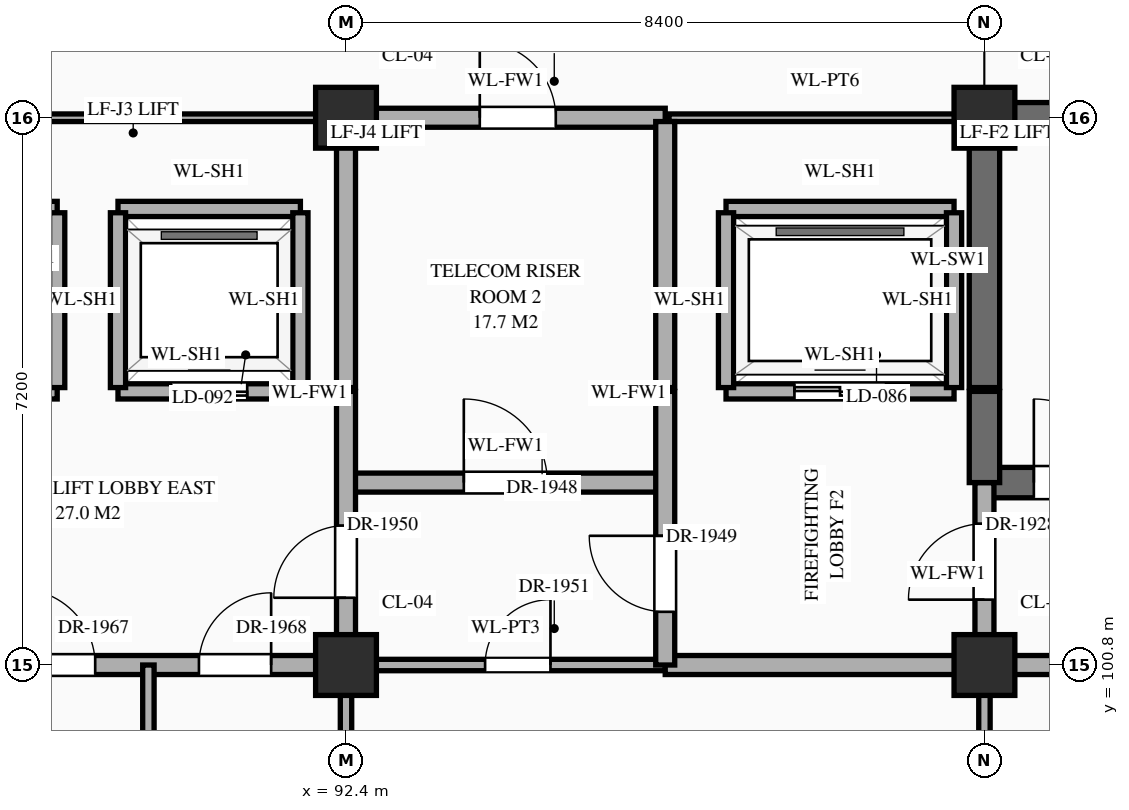
"""IFC4 building model, lengths in metres.
Left out: names, types, materials, properties, quantities, classifications, styles, units other than length and angle.
Written with IfcOpenShell. Run it as: python <this file> out.ifc"""

import sys

from ifc_helpers import new_model, si_unit, direction, frame, frame_2d, origin, origin_2d, place, context, subcontext, project, spatial, rectangle, extrude, element, fill, save


model = new_model("IFC4")
c1 = context("Model", 3, precision=1e-05, world=origin(), true_north=direction((0.0, 1.0)))
c2 = subcontext(c1, "Body", "Model", "MODEL_VIEW")
j1 = project(units=[si_unit("LENGTHUNIT", "METRE"), si_unit("PLANEANGLEUNIT", "RADIAN")], contexts=[c1])
p1 = place(None, origin())
s1 = spatial("IfcSite", under=j1, at=p1, CompositionType="ELEMENT")
p2 = place(p1, origin())
s2 = spatial("IfcBuilding", under=s1, at=p2, CompositionType="ELEMENT")
p3 = place(p2, frame((0.0, 0.0, 21.6)))
s3 = spatial("IfcBuildingStorey", under=s2, at=p3, CompositionType="ELEMENT", Elevation=21.6)
for number, where, z_axis, x_axis in (
    (1, (92.4, 100.8, 0.0), (0.0, 0.0, 1.0), (1.0, 0.0, 0.0)),
    (2, (92.4, 108.0, 0.0), (0.0, 0.0, 1.0), (1.0, 0.0, 0.0)),
    (3, (100.8, 100.8, 0.0), (0.0, 0.0, 1.0), (1.0, 0.0, 0.0)),
    (4, (100.8, 108.0, 0.0), (0.0, 0.0, 1.0), (1.0, 0.0, 0.0)),
):
    element("IfcColumn", number, at=place(p3, frame(where, z_axis=z_axis, x_axis=x_axis)), inside=s3, PredefinedType="COLUMN", context=c2, shape_type="SweptSolid", body=[
        extrude(rectangle(XDim=0.8, YDim=0.8, at=origin_2d()), origin(), (0.0, 0.0, 1.0), 4.5),
    ])
p4 = place(p3, frame((75.6, 100.8, 0.0), z_axis=(0.0, 0.0, 1.0), x_axis=(1.0, 0.0, 0.0)))
e5 = element("IfcWall", 5, at=p4, inside=s3, PredefinedType="STANDARD", context=c2, shape_type="SweptSolid", body=[
    extrude(rectangle(XDim=16.8, YDim=0.25, at=frame_2d((8.4, 0.0))), origin(), (0.0, 0.0, 1.0), 3.39),
])
p5 = place(p4, frame((3.7, 0.0, 0.0)))
e6 = element("IfcOpeningElement", 6, at=p5, cuts=e5, PredefinedType="OPENING", context=c2, shape_type="SweptSolid", body=[
    extrude(rectangle(XDim=1.0, YDim=2.2, at=frame_2d((0.5, 1.1))), frame((0.0, 0.137, 0.0), z_axis=(0.0, -1.0, 0.0), x_axis=(1.0, 0.0, 0.0)), (0.0, 0.0, 1.0), 0.274),
])
p6 = place(p4, frame((9.71, 0.0, 0.0)))
e7 = element("IfcOpeningElement", 7, at=p6, cuts=e5, PredefinedType="OPENING", context=c2, shape_type="SweptSolid", body=[
    extrude(rectangle(XDim=1.1, YDim=2.2, at=frame_2d((0.55, 1.1))), frame((0.0, 0.137, 0.0), z_axis=(0.0, -1.0, 0.0), x_axis=(1.0, 0.0, 0.0)), (0.0, 0.0, 1.0), 0.274),
])
p7 = place(p4, frame((12.5, 0.0, 0.0)))
e8 = element("IfcOpeningElement", 8, at=p7, cuts=e5, PredefinedType="OPENING", context=c2, shape_type="SweptSolid", body=[
    extrude(rectangle(XDim=1.0, YDim=2.2, at=frame_2d((0.5, 1.1))), frame((0.0, 0.137, 0.0), z_axis=(0.0, -1.0, 0.0), x_axis=(1.0, 0.0, 0.0)), (0.0, 0.0, 1.0), 0.274),
])
p8 = place(p4, frame((14.865, 0.0, 0.0)))
e9 = element("IfcOpeningElement", 9, at=p8, cuts=e5, PredefinedType="OPENING", context=c2, shape_type="SweptSolid", body=[
    extrude(rectangle(XDim=0.95, YDim=2.15, at=frame_2d((0.475, 1.075))), frame((0.0, 0.137, 0.0), z_axis=(0.0, -1.0, 0.0), x_axis=(1.0, 0.0, 0.0)), (0.0, 0.0, 1.0), 0.274),
])
p9 = place(p3, frame((92.4, 100.8, 0.0), z_axis=(0.0, 0.0, 1.0), x_axis=(1.0, 0.0, 0.0)))
e10 = element("IfcWall", 10, at=p9, inside=s3, PredefinedType="STANDARD", context=c2, shape_type="SweptSolid", body=[
    extrude(rectangle(XDim=4.2, YDim=0.15, at=frame_2d((2.1, 0.0))), origin(), (0.0, 0.0, 1.0), 3.39),
])
p10 = place(p9, frame((1.83, 0.0, 0.0)))
e11 = element("IfcOpeningElement", 11, at=p10, cuts=e10, PredefinedType="OPENING", context=c2, shape_type="SweptSolid", body=[
    extrude(rectangle(XDim=0.86, YDim=2.1, at=frame_2d((0.43, 1.05))), frame((0.0, 0.087, 0.0), z_axis=(0.0, -1.0, 0.0), x_axis=(1.0, 0.0, 0.0)), (0.0, 0.0, 1.0), 0.174),
])
p11 = place(p3, frame((96.6, 100.8, 0.0), z_axis=(0.0, 0.0, 1.0), x_axis=(1.0, 0.0, 0.0)))
e12 = element("IfcWall", 12, at=p11, inside=s3, PredefinedType="STANDARD", context=c2, shape_type="SweptSolid", body=[
    extrude(rectangle(XDim=12.6, YDim=0.25, at=frame_2d((6.3, 0.0))), origin(), (0.0, 0.0, 1.0), 3.39),
])
p12 = place(p11, frame((7.85, 0.0, 0.0)))
e13 = element("IfcOpeningElement", 13, at=p12, cuts=e12, PredefinedType="OPENING", context=c2, shape_type="SweptSolid", body=[
    extrude(rectangle(XDim=1.1, YDim=2.2, at=frame_2d((0.55, 1.1))), frame((0.0, 0.137, 0.0), z_axis=(0.0, -1.0, 0.0), x_axis=(1.0, 0.0, 0.0)), (0.0, 0.0, 1.0), 0.274),
])
p13 = place(p3, frame((92.4, 103.2, 0.0), z_axis=(0.0, 0.0, 1.0), x_axis=(1.0, 0.0, 0.0)))
e14 = element("IfcWall", 14, at=p13, inside=s3, PredefinedType="STANDARD", context=c2, shape_type="SweptSolid", body=[
    extrude(rectangle(XDim=4.2, YDim=0.25, at=frame_2d((2.1, 0.0))), origin(), (0.0, 0.0, 1.0), 4.24),
])
p14 = place(p13, frame((1.55, 0.0, 0.0)))
e15 = element("IfcOpeningElement", 15, at=p14, cuts=e14, PredefinedType="OPENING", context=c2, shape_type="SweptSolid", body=[
    extrude(rectangle(XDim=1.1, YDim=2.2, at=frame_2d((0.55, 1.1))), frame((0.0, 0.137, 0.0), z_axis=(0.0, -1.0, 0.0), x_axis=(1.0, 0.0, 0.0)), (0.0, 0.0, 1.0), 0.274),
])
p15 = place(p3, frame((100.8, 103.2, 0.0), z_axis=(0.0, 0.0, 1.0), x_axis=(1.0, 0.0, 0.0)))
e16 = element("IfcWall", 16, at=p15, inside=s3, PredefinedType="SHEAR", context=c2, shape_type="SweptSolid", body=[
    extrude(rectangle(XDim=8.4, YDim=0.4, at=frame_2d((4.2, 0.0))), origin(), (0.0, 0.0, 1.0), 4.24),
])
p16 = place(p15, frame((0.65, 0.0, 0.0)))
e17 = element("IfcOpeningElement", 17, at=p16, cuts=e16, PredefinedType="OPENING", context=c2, shape_type="SweptSolid", body=[
    extrude(rectangle(XDim=1.1, YDim=2.2, at=frame_2d((0.55, 1.1))), frame((0.0, 0.212, 0.0), z_axis=(0.0, -1.0, 0.0), x_axis=(1.0, 0.0, 0.0)), (0.0, 0.0, 1.0), 0.424),
])
p17 = place(p3, frame((86.2, 104.4, 0.0), z_axis=(0.0, 0.0, 1.0), x_axis=(1.0, 0.0, 0.0)))
e18 = element("IfcWall", 18, at=p17, inside=s3, PredefinedType="STANDARD", context=c2, shape_type="SweptSolid", body=[
    extrude(rectangle(XDim=2.4, YDim=0.2, at=frame_2d((1.2, 0.0))), origin(), (0.0, 0.0, 1.0), 4.24),
])
p18 = place(p17, frame((0.7, 0.0, 0.0)))
e19 = element("IfcOpeningElement", 19, at=p18, cuts=e18, PredefinedType="OPENING", context=c2, shape_type="SweptSolid", body=[
    extrude(rectangle(XDim=1.0, YDim=2.15, at=frame_2d((0.5, 1.075))), frame((0.0, 0.112, 0.0), z_axis=(0.0, -1.0, 0.0), x_axis=(1.0, 0.0, 0.0)), (0.0, 0.0, 1.0), 0.224),
])
p19 = place(p3, frame((89.4, 104.4, 0.0), z_axis=(0.0, 0.0, 1.0), x_axis=(1.0, 0.0, 0.0)))
e20 = element("IfcWall", 20, at=p19, inside=s3, PredefinedType="STANDARD", context=c2, shape_type="SweptSolid", body=[
    extrude(rectangle(XDim=2.4, YDim=0.2, at=frame_2d((1.2, 0.0))), origin(), (0.0, 0.0, 1.0), 4.24),
])
p20 = place(p19, frame((0.7, 0.0, 0.0)))
e21 = element("IfcOpeningElement", 21, at=p20, cuts=e20, PredefinedType="OPENING", context=c2, shape_type="SweptSolid", body=[
    extrude(rectangle(XDim=1.0, YDim=2.15, at=frame_2d((0.5, 1.075))), frame((0.0, 0.112, 0.0), z_axis=(0.0, -1.0, 0.0), x_axis=(1.0, 0.0, 0.0)), (0.0, 0.0, 1.0), 0.224),
])
p21 = place(p3, frame((97.4, 104.4, 0.0), z_axis=(0.0, 0.0, 1.0), x_axis=(1.0, 0.0, 0.0)))
e22 = element("IfcWall", 22, at=p21, inside=s3, PredefinedType="STANDARD", context=c2, shape_type="SweptSolid", body=[
    extrude(rectangle(XDim=3.0, YDim=0.2, at=frame_2d((1.5, 0.0))), origin(), (0.0, 0.0, 1.0), 4.24),
])
p22 = place(p21, frame((0.9, 0.0, 0.0)))
e23 = element("IfcOpeningElement", 23, at=p22, cuts=e22, PredefinedType="OPENING", context=c2, shape_type="SweptSolid", body=[
    extrude(rectangle(XDim=1.2, YDim=2.15, at=frame_2d((0.6, 1.075))), frame((0.0, 0.112, 0.0), z_axis=(0.0, -1.0, 0.0), x_axis=(1.0, 0.0, 0.0)), (0.0, 0.0, 1.0), 0.224),
])
for number, where, z_axis, x_axis in (
    (24, (86.2, 106.8, 0.0), (0.0, 0.0, 1.0), (1.0, 0.0, 0.0)),
    (25, (89.4, 106.8, 0.0), (0.0, 0.0, 1.0), (1.0, 0.0, 0.0)),
):
    element("IfcWall", number, at=place(p3, frame(where, z_axis=z_axis, x_axis=x_axis)), inside=s3, PredefinedType="STANDARD", context=c2, shape_type="SweptSolid", body=[
        extrude(rectangle(XDim=2.4, YDim=0.2, at=frame_2d((1.2, 0.0))), origin(), (0.0, 0.0, 1.0), 4.24),
    ])
p23 = place(p3, frame((97.4, 106.8, 0.0), z_axis=(0.0, 0.0, 1.0), x_axis=(1.0, 0.0, 0.0)))
e26 = element("IfcWall", 26, at=p23, inside=s3, PredefinedType="STANDARD", context=c2, shape_type="SweptSolid", body=[
    extrude(rectangle(XDim=3.0, YDim=0.2, at=frame_2d((1.5, 0.0))), origin(), (0.0, 0.0, 1.0), 4.24),
])
p24 = place(p3, frame((86.2, 108.0, 0.0), z_axis=(0.0, 0.0, 1.0), x_axis=(1.0, 0.0, 0.0)))
e27 = element("IfcWall", 27, at=p24, inside=s3, PredefinedType="STANDARD", context=c2, shape_type="SweptSolid", body=[
    extrude(rectangle(XDim=6.15, YDim=0.1, at=frame_2d((3.075, 0.0))), origin(), (0.0, 0.0, 1.0), 3.39),
])
p25 = place(p3, frame((92.4, 108.0, 0.0), z_axis=(0.0, 0.0, 1.0), x_axis=(1.0, 0.0, 0.0)))
e28 = element("IfcWall", 28, at=p25, inside=s3, PredefinedType="STANDARD", context=c2, shape_type="SweptSolid", body=[
    extrude(rectangle(XDim=4.2, YDim=0.25, at=frame_2d((2.1, 0.0))), origin(), (0.0, 0.0, 1.0), 3.39),
])
p26 = place(p25, frame((1.76, 0.0, 0.0)))
e29 = element("IfcOpeningElement", 29, at=p26, cuts=e28, PredefinedType="OPENING", context=c2, shape_type="SweptSolid", body=[
    extrude(rectangle(XDim=1.0, YDim=2.2, at=frame_2d((0.5, 1.1))), frame((0.0, 0.137, 0.0), z_axis=(0.0, -1.0, 0.0), x_axis=(1.0, 0.0, 0.0)), (0.0, 0.0, 1.0), 0.274),
])
p27 = place(p3, frame((96.65, 108.0, 0.0), z_axis=(0.0, 0.0, 1.0), x_axis=(1.0, 0.0, 0.0)))
e30 = element("IfcWall", 30, at=p27, inside=s3, PredefinedType="STANDARD", context=c2, shape_type="SweptSolid", body=[
    extrude(rectangle(XDim=4.1, YDim=0.1, at=frame_2d((2.05, 0.0))), origin(), (0.0, 0.0, 1.0), 3.39),
])
p28 = place(p3, frame((100.8, 108.0, 0.0), z_axis=(0.0, 0.0, 1.0), x_axis=(1.0, 0.0, 0.0)))
e31 = element("IfcWall", 31, at=p28, inside=s3, PredefinedType="SHEAR", context=c2, shape_type="SweptSolid", body=[
    extrude(rectangle(XDim=8.4, YDim=0.4, at=frame_2d((4.2, 0.0))), origin(), (0.0, 0.0, 1.0), 4.24),
])
for number, where, z_axis, x_axis in (
    (32, (88.6, 104.45, 0.0), (0.0, 0.0, 1.0), (0.0, 1.0, 0.0)),
    (33, (89.4, 104.45, 0.0), (0.0, 0.0, 1.0), (0.0, 1.0, 0.0)),
):
    element("IfcWall", number, at=place(p3, frame(where, z_axis=z_axis, x_axis=x_axis)), inside=s3, PredefinedType="STANDARD", context=c2, shape_type="SweptSolid", body=[
        extrude(rectangle(XDim=2.3, YDim=0.2, at=frame_2d((1.15, 0.0))), origin(), (0.0, 0.0, 1.0), 4.24),
    ])
p29 = place(p3, frame((89.8, 96.0, 0.0), z_axis=(0.0, 0.0, 1.0), x_axis=(0.0, 1.0, 0.0)))
e34 = element("IfcWall", 34, at=p29, inside=s3, PredefinedType="STANDARD", context=c2, shape_type="SweptSolid", body=[
    extrude(rectangle(XDim=4.8, YDim=0.15, at=frame_2d((2.4, 0.0))), origin(), (0.0, 0.0, 1.0), 4.24),
])
p30 = place(p29, frame((1.95, 0.0, 0.0)))
e35 = element("IfcOpeningElement", 35, at=p30, cuts=e34, PredefinedType="OPENING", context=c2, shape_type="SweptSolid", body=[
    extrude(rectangle(XDim=0.9, YDim=2.15, at=frame_2d((0.45, 1.075))), frame((0.0, 0.087, 0.0), z_axis=(0.0, -1.0, 0.0), x_axis=(1.0, 0.0, 0.0)), (0.0, 0.0, 1.0), 0.174),
])
p31 = place(p3, frame((91.8, 104.45, 0.0), z_axis=(0.0, 0.0, 1.0), x_axis=(0.0, 1.0, 0.0)))
e36 = element("IfcWall", 36, at=p31, inside=s3, PredefinedType="STANDARD", context=c2, shape_type="SweptSolid", body=[
    extrude(rectangle(XDim=2.3, YDim=0.2, at=frame_2d((1.15, 0.0))), origin(), (0.0, 0.0, 1.0), 4.24),
])
p32 = place(p3, frame((92.4, 96.0, 0.0), z_axis=(0.0, 0.0, 1.0), x_axis=(0.0, 1.0, 0.0)))
e37 = element("IfcWall", 37, at=p32, inside=s3, PredefinedType="STANDARD", context=c2, shape_type="SweptSolid", body=[
    extrude(rectangle(XDim=4.8, YDim=0.15, at=frame_2d((2.4, 0.0))), origin(), (0.0, 0.0, 1.0), 3.49),
])
p33 = place(p3, frame((92.4, 100.8, 0.0), z_axis=(0.0, 0.0, 1.0), x_axis=(0.0, 1.0, 0.0)))
e38 = element("IfcWall", 38, at=p33, inside=s3, PredefinedType="STANDARD", context=c2, shape_type="SweptSolid", body=[
    extrude(rectangle(XDim=3.6, YDim=0.25, at=frame_2d((1.8, 0.0))), origin(), (0.0, 0.0, 1.0), 3.49),
])
p34 = place(p33, frame((0.885, 0.0, 0.0)))
e39 = element("IfcOpeningElement", 39, at=p34, cuts=e38, PredefinedType="OPENING", context=c2, shape_type="SweptSolid", body=[
    extrude(rectangle(XDim=0.95, YDim=2.15, at=frame_2d((0.475, 1.075))), frame((0.0, 0.137, 0.0), z_axis=(0.0, -1.0, 0.0), x_axis=(1.0, 0.0, 0.0)), (0.0, 0.0, 1.0), 0.274),
])
p35 = place(p3, frame((92.4, 104.45, 0.0), z_axis=(0.0, 0.0, 1.0), x_axis=(0.0, 1.0, 0.0)))
e40 = element("IfcWall", 40, at=p35, inside=s3, PredefinedType="STANDARD", context=c2, shape_type="SweptSolid", body=[
    extrude(rectangle(XDim=3.5, YDim=0.25, at=frame_2d((1.75, 0.0))), origin(), (0.0, 0.0, 1.0), 3.49),
])
p36 = place(p3, frame((96.6, 100.8, 0.0), z_axis=(0.0, 0.0, 1.0), x_axis=(0.0, 1.0, 0.0)))
e41 = element("IfcWall", 41, at=p36, inside=s3, PredefinedType="STANDARD", context=c2, shape_type="SweptSolid", body=[
    extrude(rectangle(XDim=3.6, YDim=0.25, at=frame_2d((1.8, 0.0))), origin(), (0.0, 0.0, 1.0), 3.89),
])
p37 = place(p36, frame((0.7, 0.0, 0.0)))
e42 = element("IfcOpeningElement", 42, at=p37, cuts=e41, PredefinedType="OPENING", context=c2, shape_type="SweptSolid", body=[
    extrude(rectangle(XDim=1.0, YDim=2.2, at=frame_2d((0.5, 1.1))), frame((0.0, 0.137, 0.0), z_axis=(0.0, -1.0, 0.0), x_axis=(1.0, 0.0, 0.0)), (0.0, 0.0, 1.0), 0.274),
])
p38 = place(p3, frame((96.6, 104.45, 0.0), z_axis=(0.0, 0.0, 1.0), x_axis=(0.0, 1.0, 0.0)))
e43 = element("IfcWall", 43, at=p38, inside=s3, PredefinedType="STANDARD", context=c2, shape_type="SweptSolid", body=[
    extrude(rectangle(XDim=3.5, YDim=0.25, at=frame_2d((1.75, 0.0))), origin(), (0.0, 0.0, 1.0), 3.89),
])
for number, where, z_axis, x_axis in (
    (44, (97.4, 104.45, 0.0), (0.0, 0.0, 1.0), (0.0, 1.0, 0.0)),
    (45, (100.4, 104.45, 0.0), (0.0, 0.0, 1.0), (0.0, 1.0, 0.0)),
):
    element("IfcWall", number, at=place(p3, frame(where, z_axis=z_axis, x_axis=x_axis)), inside=s3, PredefinedType="STANDARD", context=c2, shape_type="SweptSolid", body=[
        extrude(rectangle(XDim=2.3, YDim=0.2, at=frame_2d((1.15, 0.0))), origin(), (0.0, 0.0, 1.0), 4.24),
    ])
p39 = place(p3, frame((100.8, 96.0, 0.0), z_axis=(0.0, 0.0, 1.0), x_axis=(0.0, 1.0, 0.0)))
e46 = element("IfcWall", 46, at=p39, inside=s3, PredefinedType="STANDARD", context=c2, shape_type="SweptSolid", body=[
    extrude(rectangle(XDim=4.8, YDim=0.15, at=frame_2d((2.4, 0.0))), origin(), (0.0, 0.0, 1.0), 3.49),
])
p40 = place(p3, frame((100.8, 100.8, 0.0), z_axis=(0.0, 0.0, 1.0), x_axis=(0.0, 1.0, 0.0)))
e47 = element("IfcWall", 47, at=p40, inside=s3, PredefinedType="STANDARD", context=c2, shape_type="SweptSolid", body=[
    extrude(rectangle(XDim=2.4, YDim=0.25, at=frame_2d((1.2, 0.0))), origin(), (0.0, 0.0, 1.0), 3.49),
])
p41 = place(p40, frame((0.86, 0.0, 0.0)))
e48 = element("IfcOpeningElement", 48, at=p41, cuts=e47, PredefinedType="OPENING", context=c2, shape_type="SweptSolid", body=[
    extrude(rectangle(XDim=1.0, YDim=2.2, at=frame_2d((0.5, 1.1))), frame((0.0, 0.137, 0.0), z_axis=(0.0, -1.0, 0.0), x_axis=(1.0, 0.0, 0.0)), (0.0, 0.0, 1.0), 0.274),
])
p42 = place(p3, frame((100.8, 103.2, 0.0), z_axis=(0.0, 0.0, 1.0), x_axis=(0.0, 1.0, 0.0)))
e49 = element("IfcWall", 49, at=p42, inside=s3, PredefinedType="SHEAR", context=c2, shape_type="SweptSolid", body=[
    extrude(rectangle(XDim=1.2, YDim=0.4, at=frame_2d((0.6, 0.0))), origin(), (0.0, 0.0, 1.0), 4.24),
])
p43 = place(p3, frame((100.8, 104.45, 0.0), z_axis=(0.0, 0.0, 1.0), x_axis=(0.0, 1.0, 0.0)))
e50 = element("IfcWall", 50, at=p43, inside=s3, PredefinedType="SHEAR", context=c2, shape_type="SweptSolid", body=[
    extrude(rectangle(XDim=3.5, YDim=0.4, at=frame_2d((1.75, 0.0))), origin(), (0.0, 0.0, 1.0), 4.24),
])
p44 = place(p22, origin())
e51 = element("IfcDoor", 51, at=p44, inside=s3, OperationType="DOUBLE_DOOR_SLIDING", PredefinedType="DOOR", context=c2, shape_type="SweptSolid", body=[
    extrude(rectangle(XDim=1.2, YDim=2.15, at=frame_2d((0.6, 1.075))), frame((0.0, 0.025, 0.0), z_axis=(0.0, -1.0, 0.0), x_axis=(1.0, 0.0, 0.0)), (0.0, 0.0, 1.0), 0.05),
])
fill(e23, e51)
p45 = place(p20, origin())
e52 = element("IfcDoor", 52, at=p45, inside=s3, OperationType="DOUBLE_DOOR_SLIDING", PredefinedType="DOOR", context=c2, shape_type="SweptSolid", body=[
    extrude(rectangle(XDim=1.0, YDim=2.15, at=frame_2d((0.5, 1.075))), frame((0.0, 0.025, 0.0), z_axis=(0.0, -1.0, 0.0), x_axis=(1.0, 0.0, 0.0)), (0.0, 0.0, 1.0), 0.05),
])
fill(e21, e52)
p46 = place(p16, origin())
e53 = element("IfcDoor", 53, at=p46, inside=s3, OperationType="SINGLE_SWING_LEFT", PredefinedType="DOOR", context=c2, shape_type="SweptSolid", body=[
    extrude(rectangle(XDim=1.1, YDim=2.2, at=frame_2d((0.55, 1.1))), frame((0.0, 0.025, 0.0), z_axis=(0.0, -1.0, 0.0), x_axis=(1.0, 0.0, 0.0)), (0.0, 0.0, 1.0), 0.05),
])
fill(e17, e53)
p47 = place(p41, origin())
e54 = element("IfcDoor", 54, at=p47, inside=s3, OperationType="SINGLE_SWING_LEFT", PredefinedType="DOOR", context=c2, shape_type="SweptSolid", body=[
    extrude(rectangle(XDim=1.0, YDim=2.2, at=frame_2d((0.5, 1.1))), frame((0.0, 0.025, 0.0), z_axis=(0.0, -1.0, 0.0), x_axis=(1.0, 0.0, 0.0)), (0.0, 0.0, 1.0), 0.05),
])
fill(e48, e54)
p48 = place(p14, origin())
e55 = element("IfcDoor", 55, at=p48, inside=s3, OperationType="SINGLE_SWING_LEFT", PredefinedType="DOOR", context=c2, shape_type="SweptSolid", body=[
    extrude(rectangle(XDim=1.1, YDim=2.2, at=frame_2d((0.55, 1.1))), frame((0.0, 0.025, 0.0), z_axis=(0.0, -1.0, 0.0), x_axis=(1.0, 0.0, 0.0)), (0.0, 0.0, 1.0), 0.05),
])
fill(e15, e55)
p49 = place(p37, origin())
e56 = element("IfcDoor", 56, at=p49, inside=s3, OperationType="SINGLE_SWING_RIGHT", PredefinedType="DOOR", context=c2, shape_type="SweptSolid", body=[
    extrude(rectangle(XDim=1.0, YDim=2.2, at=frame_2d((0.5, 1.1))), frame((0.0, 0.025, 0.0), z_axis=(0.0, -1.0, 0.0), x_axis=(1.0, 0.0, 0.0)), (0.0, 0.0, 1.0), 0.05),
])
fill(e42, e56)
p50 = place(p34, origin())
e57 = element("IfcDoor", 57, at=p50, inside=s3, OperationType="SINGLE_SWING_LEFT", PredefinedType="DOOR", context=c2, shape_type="SweptSolid", body=[
    extrude(rectangle(XDim=0.95, YDim=2.15, at=frame_2d((0.475, 1.075))), frame((0.0, 0.025, 0.0), z_axis=(0.0, -1.0, 0.0), x_axis=(1.0, 0.0, 0.0)), (0.0, 0.0, 1.0), 0.05),
])
fill(e39, e57)
p51 = place(p10, origin())
e58 = element("IfcDoor", 58, at=p51, inside=s3, OperationType="SINGLE_SWING_RIGHT", PredefinedType="DOOR", context=c2, shape_type="SweptSolid", body=[
    extrude(rectangle(XDim=0.86, YDim=2.1, at=frame_2d((0.43, 1.05))), frame((0.0, 0.025, 0.0), z_axis=(0.0, -1.0, 0.0), x_axis=(1.0, 0.0, 0.0)), (0.0, 0.0, 1.0), 0.05),
])
fill(e11, e58)
p52 = place(p26, origin())
e59 = element("IfcDoor", 59, at=p52, inside=s3, OperationType="SINGLE_SWING_LEFT", PredefinedType="DOOR", context=c2, shape_type="SweptSolid", body=[
    extrude(rectangle(XDim=1.0, YDim=2.2, at=frame_2d((0.5, 1.1))), frame((0.0, 0.025, 0.0), z_axis=(0.0, -1.0, 0.0), x_axis=(1.0, 0.0, 0.0)), (0.0, 0.0, 1.0), 0.05),
])
fill(e29, e59)
p53 = place(p7, origin())
e60 = element("IfcDoor", 60, at=p53, inside=s3, OperationType="SINGLE_SWING_LEFT", PredefinedType="DOOR", context=c2, shape_type="SweptSolid", body=[
    extrude(rectangle(XDim=1.0, YDim=2.2, at=frame_2d((0.5, 1.1))), frame((0.0, 0.025, 0.0), z_axis=(0.0, -1.0, 0.0), x_axis=(1.0, 0.0, 0.0)), (0.0, 0.0, 1.0), 0.05),
])
fill(e8, e60)
p54 = place(p8, origin())
e61 = element("IfcDoor", 61, at=p54, inside=s3, OperationType="SINGLE_SWING_RIGHT", PredefinedType="DOOR", context=c2, shape_type="SweptSolid", body=[
    extrude(rectangle(XDim=0.95, YDim=2.15, at=frame_2d((0.475, 1.075))), frame((0.0, 0.025, 0.0), z_axis=(0.0, -1.0, 0.0), x_axis=(1.0, 0.0, 0.0)), (0.0, 0.0, 1.0), 0.05),
])
fill(e9, e61)
save(model, sys.argv[1])
